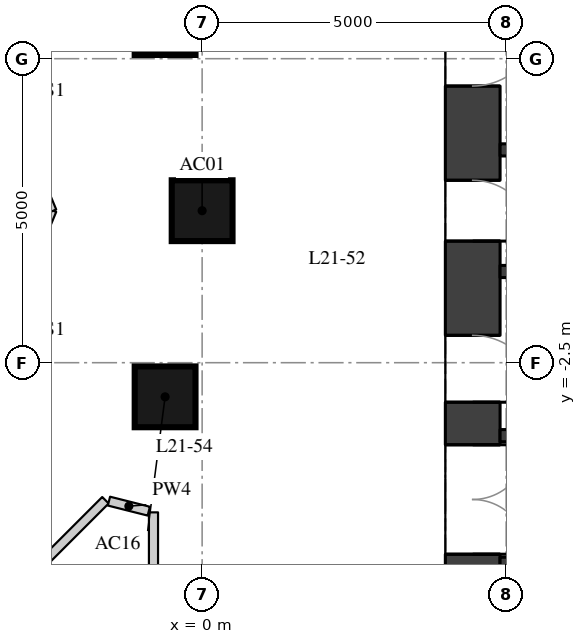
"""IFC4 building model, lengths in metres.
Left out: names, types, materials, properties, quantities, classifications, styles, units other than length and angle.
Written with IfcOpenShell. Run it as: python <this file> out.ifc"""

import sys

from ifc_helpers import new_model, si_unit, direction, frame, frame_2d, origin, origin_2d, place, context, subcontext, project, spatial, rectangle, extrude, element, fill, save


model = new_model("IFC4")
c1 = context("Model", 3, precision=1e-05, world=origin(), true_north=direction((0.0, 1.0)))
c2 = subcontext(c1, "Body", "Model", "MODEL_VIEW")
j1 = project(units=[si_unit("LENGTHUNIT", "METRE"), si_unit("PLANEANGLEUNIT", "RADIAN")], contexts=[c1])
p1 = place(None, origin())
s1 = spatial("IfcSite", under=j1, at=p1, CompositionType="ELEMENT")
p2 = place(p1, origin())
s2 = spatial("IfcBuilding", under=s1, at=p2, CompositionType="ELEMENT")
p3 = place(p2, frame((0.0, 0.0, 77.8)))
s3 = spatial("IfcBuildingStorey", under=s2, at=p3, CompositionType="ELEMENT", Elevation=77.8)
for number, where, z_axis, x_axis in (
    (1, (0.0, 0.0, 0.0), (0.0, 0.0, 1.0), (1.0, 0.0, 0.0)),
    (2, (-0.609, 3.062, 0.0), (0.0, 0.0, 1.0), (1.0, 0.0, 0.0)),
    (3, (-0.609, -3.062, 0.0), (0.0, 0.0, 1.0), (1.0, 0.0, 0.0)),
):
    element("IfcColumn", number, at=place(p3, frame(where, z_axis=z_axis, x_axis=x_axis)), inside=s3, PredefinedType="COLUMN", context=c2, shape_type="SweptSolid", body=[
        extrude(rectangle(XDim=1.0, YDim=1.0, at=origin_2d()), origin(), (0.0, 0.0, 1.0), 3.3),
    ])
p4 = place(p3, frame((4.45, -11.1, 0.0), z_axis=(0.0, 0.0, 1.0), x_axis=(0.0, 1.0, 0.0)))
e4 = element("IfcWall", 4, at=p4, inside=s3, PredefinedType="SHEAR", context=c2, shape_type="SweptSolid", body=[
    extrude(rectangle(XDim=22.2, YDim=0.9, at=frame_2d((11.1, 0.0))), origin(), (0.0, 0.0, 1.0), 3.02),
])
p5 = place(p4, frame((2.35, 0.0, 0.0)))
e5 = element("IfcOpeningElement", 5, at=p5, cuts=e4, PredefinedType="OPENING", context=c2, shape_type="SweptSolid", body=[
    extrude(rectangle(XDim=1.5, YDim=2.1, at=frame_2d((0.75, 1.05))), frame((0.0, 0.46, 0.0), z_axis=(0.0, -1.0, 0.0), x_axis=(1.0, 0.0, 0.0)), (0.0, 0.0, 1.0), 0.92),
])
p6 = place(p4, frame((5.45, 0.0, 0.0)))
e6 = element("IfcOpeningElement", 6, at=p6, cuts=e4, PredefinedType="OPENING", context=c2, shape_type="SweptSolid", body=[
    extrude(rectangle(XDim=1.8, YDim=2.1, at=frame_2d((0.9, 1.05))), frame((0.0, 0.46, 0.0), z_axis=(0.0, -1.0, 0.0), x_axis=(1.0, 0.0, 0.0)), (0.0, 0.0, 1.0), 0.92),
])
p7 = place(p4, frame((7.95, 0.0, 0.0)))
e7 = element("IfcOpeningElement", 7, at=p7, cuts=e4, PredefinedType="OPENING", context=c2, shape_type="SweptSolid", body=[
    extrude(rectangle(XDim=1.1, YDim=2.1, at=frame_2d((0.55, 1.05))), frame((0.0, 0.46, 0.0), z_axis=(0.0, -1.0, 0.0), x_axis=(1.0, 0.0, 0.0)), (0.0, 0.0, 1.0), 0.92),
])
p8 = place(p4, frame((10.6, 0.0, 0.0)))
e8 = element("IfcOpeningElement", 8, at=p8, cuts=e4, PredefinedType="OPENING", context=c2, shape_type="SweptSolid", body=[
    extrude(rectangle(XDim=1.0, YDim=2.1, at=frame_2d((0.5, 1.05))), frame((0.0, 0.46, 0.0), z_axis=(0.0, -1.0, 0.0), x_axis=(1.0, 0.0, 0.0)), (0.0, 0.0, 1.0), 0.92),
])
p9 = place(p4, frame((13.15, 0.0, 0.0)))
e9 = element("IfcOpeningElement", 9, at=p9, cuts=e4, PredefinedType="OPENING", context=c2, shape_type="SweptSolid", body=[
    extrude(rectangle(XDim=1.1, YDim=2.1, at=frame_2d((0.55, 1.05))), frame((0.0, 0.46, 0.0), z_axis=(0.0, -1.0, 0.0), x_axis=(1.0, 0.0, 0.0)), (0.0, 0.0, 1.0), 0.92),
])
p10 = place(p4, frame((14.95, 0.0, 0.0)))
e10 = element("IfcOpeningElement", 10, at=p10, cuts=e4, PredefinedType="OPENING", context=c2, shape_type="SweptSolid", body=[
    extrude(rectangle(XDim=1.8, YDim=2.1, at=frame_2d((0.9, 1.05))), frame((0.0, 0.46, 0.0), z_axis=(0.0, -1.0, 0.0), x_axis=(1.0, 0.0, 0.0)), (0.0, 0.0, 1.0), 0.92),
])
p11 = place(p4, frame((18.35, 0.0, 0.0)))
e11 = element("IfcOpeningElement", 11, at=p11, cuts=e4, PredefinedType="OPENING", context=c2, shape_type="SweptSolid", body=[
    extrude(rectangle(XDim=1.5, YDim=2.1, at=frame_2d((0.75, 1.05))), frame((0.0, 0.46, 0.0), z_axis=(0.0, -1.0, 0.0), x_axis=(1.0, 0.0, 0.0)), (0.0, 0.0, 1.0), 0.92),
])
for number, where, z_axis, x_axis in (
    (12, (4.9, 1.0, 0.0), (0.0, 0.0, 1.0), (1.0, 0.0, 0.0)),
    (13, (4.9, -1.0, 0.0), (0.0, 0.0, 1.0), (1.0, 0.0, 0.0)),
):
    element("IfcWall", number, at=place(p3, frame(where, z_axis=z_axis, x_axis=x_axis)), inside=s3, PredefinedType="SHEAR", context=c2, shape_type="SweptSolid", body=[
        extrude(rectangle(XDim=10.2, YDim=0.2, at=frame_2d((5.1, 0.0))), origin(), (0.0, 0.0, 1.0), 3.02),
    ])
p12 = place(p3, frame((4.9, -3.7, 0.0), z_axis=(0.0, 0.0, 1.0), x_axis=(1.0, 0.0, 0.0)))
e14 = element("IfcWall", 14, at=p12, inside=s3, PredefinedType="SHEAR", context=c2, shape_type="SweptSolid", body=[
    extrude(rectangle(XDim=10.2, YDim=0.2, at=frame_2d((5.1, 0.0))), origin(), (0.0, 0.0, 1.0), 3.02),
])
p13 = place(p12, frame((6.3, 0.0, 0.0)))
e15 = element("IfcOpeningElement", 15, at=p13, cuts=e14, PredefinedType="OPENING", context=c2, shape_type="SweptSolid", body=[
    extrude(rectangle(XDim=1.1, YDim=2.1, at=frame_2d((0.55, 1.05))), frame((0.0, 0.11, 0.0), z_axis=(0.0, -1.0, 0.0), x_axis=(1.0, 0.0, 0.0)), (0.0, 0.0, 1.0), 0.22),
])
p14 = place(p12, frame((8.6, 0.0, 0.0)))
e16 = element("IfcOpeningElement", 16, at=p14, cuts=e14, PredefinedType="OPENING", context=c2, shape_type="SweptSolid", body=[
    extrude(rectangle(XDim=1.1, YDim=2.1, at=frame_2d((0.55, 1.05))), frame((0.0, 0.11, 0.0), z_axis=(0.0, -1.0, 0.0), x_axis=(1.0, 0.0, 0.0)), (0.0, 0.0, 1.0), 0.22),
])
p15 = place(p3, frame((4.9, -5.8, 0.0), z_axis=(0.0, 0.0, 1.0), x_axis=(1.0, 0.0, 0.0)))
e17 = element("IfcWall", 17, at=p15, inside=s3, PredefinedType="SHEAR", context=c2, shape_type="SweptSolid", body=[
    extrude(rectangle(XDim=10.2, YDim=0.2, at=frame_2d((5.1, 0.0))), origin(), (0.0, 0.0, 1.0), 3.02),
])
p16 = place(p3, frame((-0.8, -4.961, 0.0), z_axis=(0.0, 0.0, 1.0), x_axis=(0.0, -1.0, 0.0)))
e18 = element("IfcWall", 18, at=p16, inside=s3, PredefinedType="PARTITIONING", context=c2, shape_type="SweptSolid", body=[
    extrude(rectangle(XDim=4.188, YDim=0.15, at=frame_2d((2.094, 0.0))), origin(), (0.0, 0.0, 1.0), 3.02),
])
p17 = place(p16, frame((1.644, 0.0, 0.0)))
e19 = element("IfcOpeningElement", 19, at=p17, cuts=e18, PredefinedType="OPENING", context=c2, shape_type="SweptSolid", body=[
    extrude(rectangle(XDim=0.9, YDim=2.1, at=frame_2d((0.45, 1.05))), frame((0.0, 0.085, 0.0), z_axis=(0.0, -1.0, 0.0), x_axis=(1.0, 0.0, 0.0)), (0.0, 0.0, 1.0), 0.17),
])
p18 = place(p3, frame((-3.882, -7.055, 0.0), z_axis=(0.0, 0.0, 1.0), x_axis=(0.707069126061, 0.707144434307, 0.0)))
e20 = element("IfcWall", 20, at=p18, inside=s3, PredefinedType="PARTITIONING", context=c2, shape_type="SweptSolid", body=[
    extrude(rectangle(XDim=3.242, YDim=0.15, at=frame_2d((1.621, 0.0))), origin(), (0.0, 0.0, 1.0), 3.02),
])
p19 = place(p3, frame((-1.532, -4.777, 0.0), z_axis=(0.0, 0.0, 1.0), x_axis=(0.969694394352, -0.244321062461, 0.0)))
e21 = element("IfcWall", 21, at=p19, inside=s3, PredefinedType="PARTITIONING", context=c2, shape_type="SweptSolid", body=[
    extrude(rectangle(XDim=0.676, YDim=0.15, at=frame_2d((0.338, 0.0))), origin(), (0.0, 0.0, 1.0), 3.02),
])
for number, where, z_axis, x_axis in (
    (22, (-2.446, 0.0, 0.0), (0.0, 0.0, 1.0), (-0.383, -0.924, 0.0)),
    (23, (-4.073, 3.927, 0.0), (0.0, 0.0, 1.0), (0.383, -0.924, 0.0)),
):
    element("IfcWall", number, at=place(p3, frame(where, z_axis=z_axis, x_axis=x_axis)), inside=s3, PredefinedType="PARTITIONING", context=c2, shape_type="SweptSolid", body=[
        extrude(rectangle(XDim=4.251, YDim=0.1, at=frame_2d((2.125, 0.0))), origin(), (0.0, 0.0, 1.0), 3.02),
    ])
p20 = place(p6, origin())
e24 = element("IfcDoor", 24, at=p20, inside=s3, OperationType="DOUBLE_DOOR_SINGLE_SWING", PredefinedType="DOOR", context=c2, shape_type="SweptSolid", body=[
    extrude(rectangle(XDim=1.8, YDim=2.1, at=frame_2d((0.9, 1.05))), frame((0.0, 0.025, 0.0), z_axis=(0.0, -1.0, 0.0), x_axis=(1.0, 0.0, 0.0)), (0.0, 0.0, 1.0), 0.05),
])
fill(e6, e24)
p21 = place(p7, origin())
e25 = element("IfcDoor", 25, at=p21, inside=s3, OperationType="SINGLE_SWING_RIGHT", PredefinedType="DOOR", context=c2, shape_type="SweptSolid", body=[
    extrude(rectangle(XDim=1.1, YDim=2.1, at=frame_2d((0.55, 1.05))), frame((0.0, 0.025, 0.0), z_axis=(0.0, -1.0, 0.0), x_axis=(1.0, 0.0, 0.0)), (0.0, 0.0, 1.0), 0.05),
])
fill(e7, e25)
p22 = place(p8, origin())
e26 = element("IfcDoor", 26, at=p22, inside=s3, OperationType="SINGLE_SWING_RIGHT", PredefinedType="DOOR", context=c2, shape_type="SweptSolid", body=[
    extrude(rectangle(XDim=1.0, YDim=2.1, at=frame_2d((0.5, 1.05))), frame((0.0, 0.025, 0.0), z_axis=(0.0, -1.0, 0.0), x_axis=(1.0, 0.0, 0.0)), (0.0, 0.0, 1.0), 0.05),
])
fill(e8, e26)
p23 = place(p9, origin())
e27 = element("IfcDoor", 27, at=p23, inside=s3, OperationType="SINGLE_SWING_LEFT", PredefinedType="DOOR", context=c2, shape_type="SweptSolid", body=[
    extrude(rectangle(XDim=1.1, YDim=2.1, at=frame_2d((0.55, 1.05))), frame((0.0, 0.025, 0.0), z_axis=(0.0, -1.0, 0.0), x_axis=(1.0, 0.0, 0.0)), (0.0, 0.0, 1.0), 0.05),
])
fill(e9, e27)
save(model, sys.argv[1])
